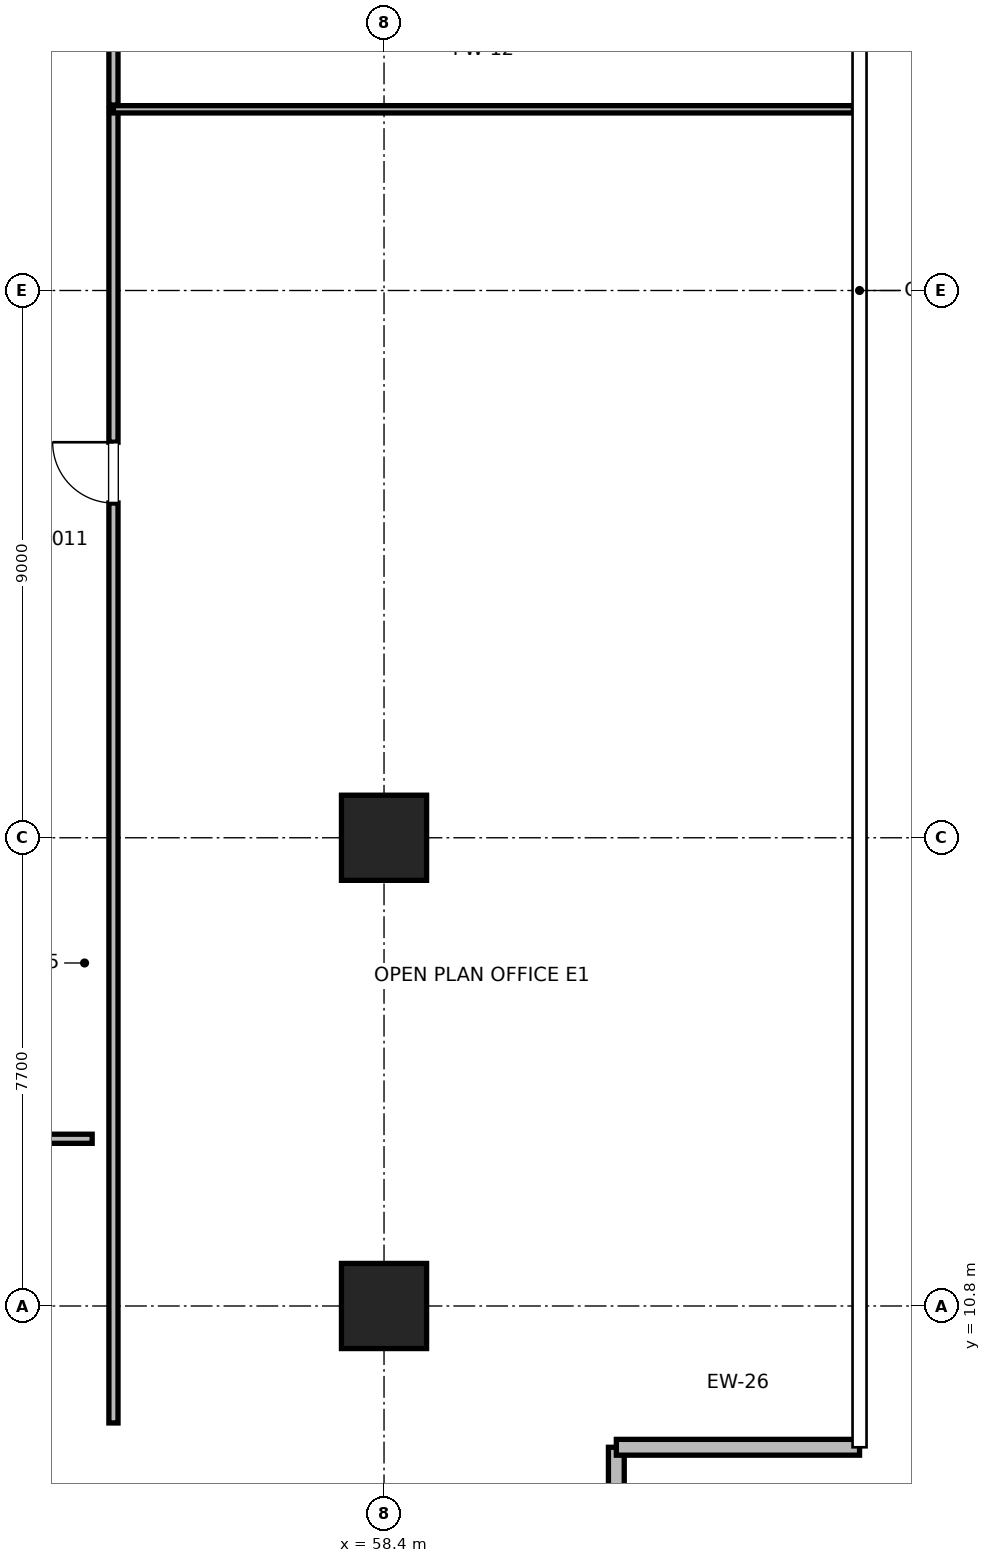
"""IFC4 building model, lengths in metres.
Left out: names, types, materials, properties, quantities, classifications, styles, units other than length and angle.
Written with IfcOpenShell. Run it as: python <this file> out.ifc"""

import sys

from ifc_helpers import new_model, si_unit, direction, frame, frame_2d, origin, origin_2d, place, context, subcontext, project, spatial, rectangle, extrude, element, fill, save


model = new_model("IFC4")
c1 = context("Model", 3, precision=1e-05, world=origin(), true_north=direction((0.0, 1.0)))
c2 = subcontext(c1, "Body", "Model", "MODEL_VIEW")
j1 = project(units=[si_unit("LENGTHUNIT", "METRE"), si_unit("PLANEANGLEUNIT", "RADIAN")], contexts=[c1])
p1 = place(None, origin())
s1 = spatial("IfcSite", under=j1, at=p1, CompositionType="ELEMENT")
p2 = place(p1, origin())
s2 = spatial("IfcBuilding", under=s1, at=p2, CompositionType="ELEMENT")
p3 = place(p2, frame((0.0, 0.0, 238.2)))
s3 = spatial("IfcBuildingStorey", under=s2, at=p3, CompositionType="ELEMENT", Elevation=238.2)
for number, where, z_axis, x_axis in (
    (1, (58.4, 18.5, 0.0), (0.0, 0.0, 1.0), (1.0, 0.0, 0.0)),
    (2, (58.4, 10.8, 0.0), (0.0, 0.0, 1.0), (1.0, 0.0, 0.0)),
):
    element("IfcColumn", number, at=place(p3, frame(where, z_axis=z_axis, x_axis=x_axis)), inside=s3, PredefinedType="COLUMN", context=c2, shape_type="SweptSolid", body=[
        extrude(rectangle(XDim=1.4, YDim=1.4, at=origin_2d()), origin(), (0.0, 0.0, 1.0), 5.0),
    ])
p4 = place(p3, frame((62.221, 4.977, 0.0), z_axis=(0.0, 0.0, 1.0), x_axis=(0.0, 1.0, 0.0)))
e3 = element("IfcWall", 3, at=p4, inside=s3, PredefinedType="PARAPET", context=c2, shape_type="SweptSolid", body=[
    extrude(rectangle(XDim=3.5, YDim=0.26, at=frame_2d((1.75, 0.0))), origin(), (0.0, 0.0, 1.0), 4.785),
])
p5 = place(p4, frame((1.05, 0.0, 0.85)))
e4 = element("IfcOpeningElement", 4, at=p5, cuts=e3, PredefinedType="OPENING", context=c2, shape_type="SweptSolid", body=[
    extrude(rectangle(XDim=1.4, YDim=2.0, at=frame_2d((0.7, 1.0))), frame((0.0, 0.13, 0.0), z_axis=(0.0, -1.0, 0.0), x_axis=(1.0, 0.0, 0.0)), (0.0, 0.0, 1.0), 0.26),
])
p6 = place(p3, frame((62.221, 8.477, 0.0), z_axis=(0.0, 0.0, 1.0), x_axis=(1.0, 0.0, 0.0)))
e5 = element("IfcWall", 5, at=p6, inside=s3, PredefinedType="PARAPET", context=c2, shape_type="SweptSolid", body=[
    extrude(rectangle(XDim=4.0, YDim=0.26, at=frame_2d((2.0, 0.0))), origin(), (0.0, 0.0, 1.0), 4.785),
])
p7 = place(p3, frame((26.4, 13.55, 0.0), z_axis=(0.0, 0.0, 1.0), x_axis=(1.0, 0.0, 0.0)))
e6 = element("IfcWall", 6, at=p7, inside=s3, PredefinedType="PARTITIONING", context=c2, shape_type="SweptSolid", body=[
    extrude(rectangle(XDim=27.2, YDim=0.15, at=frame_2d((13.6, 0.0))), origin(), (0.0, 0.0, 1.0), 2.85),
])
p8 = place(p7, frame((13.1, 0.0, 0.0)))
e7 = element("IfcOpeningElement", 7, at=p8, cuts=e6, PredefinedType="OPENING", context=c2, shape_type="SweptSolid", body=[
    extrude(rectangle(XDim=1.0, YDim=2.15, at=frame_2d((0.5, 1.075))), frame((0.0, 0.075, 0.0), z_axis=(0.0, -1.0, 0.0), x_axis=(1.0, 0.0, 0.0)), (0.0, 0.0, 1.0), 0.15),
])
p9 = place(p3, frame((53.95, 8.877, 0.0), z_axis=(0.0, 0.0, 1.0), x_axis=(0.0, 1.0, 0.0)))
e8 = element("IfcWall", 8, at=p9, inside=s3, PredefinedType="PARTITIONING", context=c2, shape_type="SweptSolid", body=[
    extrude(rectangle(XDim=21.603, YDim=0.15, at=frame_2d((10.802, 0.0))), origin(), (0.0, 0.0, 1.0), 2.85),
])
p10 = place(p9, frame((15.128, 0.0, 0.0)))
e9 = element("IfcOpeningElement", 9, at=p10, cuts=e8, PredefinedType="OPENING", context=c2, shape_type="SweptSolid", body=[
    extrude(rectangle(XDim=1.0, YDim=2.15, at=frame_2d((0.5, 1.075))), frame((0.0, 0.075, 0.0), z_axis=(0.0, -1.0, 0.0), x_axis=(1.0, 0.0, 0.0)), (0.0, 0.0, 1.0), 0.15),
])
p11 = place(p3, frame((53.95, 30.48, 0.0), z_axis=(0.0, 0.0, 1.0), x_axis=(1.0, 0.0, 0.0)))
e10 = element("IfcWall", 10, at=p11, inside=s3, PredefinedType="PARTITIONING", context=c2, shape_type="SweptSolid", body=[
    extrude(rectangle(XDim=12.171, YDim=0.12, at=frame_2d((6.085, 0.0))), origin(), (0.0, 0.0, 1.0), 2.85),
])
p12 = place(p3, frame((53.95, 30.55, 0.0), z_axis=(0.0, 0.0, 1.0), x_axis=(0.0, 1.0, 0.0)))
e11 = element("IfcWall", 11, at=p12, inside=s3, PredefinedType="PARTITIONING", context=c2, shape_type="SweptSolid", body=[
    extrude(rectangle(XDim=15.573, YDim=0.15, at=frame_2d((7.787, 0.0))), origin(), (0.0, 0.0, 1.0), 2.85),
])
p13 = place(p12, frame((2.4, 0.0, 0.0)))
e12 = element("IfcOpeningElement", 12, at=p13, cuts=e11, PredefinedType="OPENING", context=c2, shape_type="SweptSolid", body=[
    extrude(rectangle(XDim=1.05, YDim=2.2, at=frame_2d((0.525, 1.1))), frame((0.0, 0.075, 0.0), z_axis=(0.0, -1.0, 0.0), x_axis=(1.0, 0.0, 0.0)), (0.0, 0.0, 1.0), 0.15),
])
p14 = place(p10, origin())
e13 = element("IfcDoor", 13, at=p14, inside=s3, OperationType="SINGLE_SWING_RIGHT", PredefinedType="DOOR", context=c2, shape_type="SweptSolid", body=[
    extrude(rectangle(XDim=1.0, YDim=2.15, at=frame_2d((0.5, 1.075))), frame((0.0, 0.025, 0.0), z_axis=(0.0, -1.0, 0.0), x_axis=(1.0, 0.0, 0.0)), (0.0, 0.0, 1.0), 0.05),
])
fill(e9, e13)
save(model, sys.argv[1])
